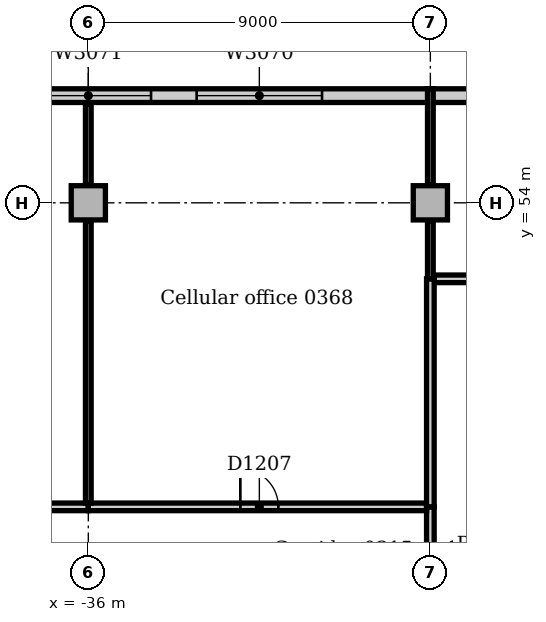
"""IFC4 building model, lengths in metres.
Left out: names, types, materials, properties, quantities, classifications, styles, units other than length and angle.
Written with IfcOpenShell. Run it as: python <this file> out.ifc"""

import sys

from ifc_helpers import new_model, si_unit, direction, frame, frame_2d, origin, origin_2d, place, context, subcontext, project, spatial, rectangle, extrude, element, fill, save


model = new_model("IFC4")
c1 = context("Model", 3, precision=1e-05, world=origin(), true_north=direction((0.0, 1.0)))
c2 = subcontext(c1, "Body", "Model", "MODEL_VIEW")
j1 = project(units=[si_unit("LENGTHUNIT", "METRE"), si_unit("PLANEANGLEUNIT", "RADIAN")], contexts=[c1])
p1 = place(None, origin())
s1 = spatial("IfcSite", under=j1, at=p1, CompositionType="ELEMENT")
p2 = place(p1, origin())
s2 = spatial("IfcBuilding", under=s1, at=p2, CompositionType="ELEMENT")
p3 = place(p2, frame((0.0, 0.0, 16.0)))
s3 = spatial("IfcBuildingStorey", under=s2, at=p3, CompositionType="ELEMENT", Elevation=16.0)
for number, where, z_axis, x_axis in (
    (1, (-36.0, 54.0, 0.0), (0.0, 0.0, 1.0), (1.0, 0.0, 0.0)),
    (2, (-27.0, 54.0, 0.0), (0.0, 0.0, 1.0), (1.0, 0.0, 0.0)),
):
    element("IfcColumn", number, at=place(p3, frame(where, z_axis=z_axis, x_axis=x_axis)), inside=s3, PredefinedType="COLUMN", context=c2, shape_type="SweptSolid", body=[
        extrude(rectangle(XDim=0.9, YDim=0.9, at=origin_2d()), origin(), (0.0, 0.0, 1.0), 4.7),
    ])
p4 = place(p3, frame((63.0, 56.82, 0.0), z_axis=(0.0, 0.0, 1.0), x_axis=(-1.0, 0.0, 0.0)))
e3 = element("IfcWall", 3, at=p4, inside=s3, PredefinedType="STANDARD", context=c2, shape_type="SweptSolid", body=[
    extrude(rectangle(XDim=144.0, YDim=0.36, at=frame_2d((72.0, 0.0))), origin(), (0.0, 0.0, 1.0), 4.7),
])
p5 = place(p4, frame((2.85, 0.0, 0.9)))
e4 = element("IfcOpeningElement", 4, at=p5, cuts=e3, PredefinedType="OPENING", context=c2, shape_type="SweptSolid", body=[
    extrude(rectangle(XDim=3.3, YDim=2.4, at=frame_2d((1.65, 1.2))), frame((0.0, 0.19, 0.0), z_axis=(0.0, -1.0, 0.0), x_axis=(1.0, 0.0, 0.0)), (0.0, 0.0, 1.0), 0.38),
])
p6 = place(p4, frame((7.35, 0.0, 0.9)))
e5 = element("IfcOpeningElement", 5, at=p6, cuts=e3, PredefinedType="OPENING", context=c2, shape_type="SweptSolid", body=[
    extrude(rectangle(XDim=3.3, YDim=2.4, at=frame_2d((1.65, 1.2))), frame((0.0, 0.19, 0.0), z_axis=(0.0, -1.0, 0.0), x_axis=(1.0, 0.0, 0.0)), (0.0, 0.0, 1.0), 0.38),
])
p7 = place(p4, frame((11.85, 0.0, 0.9)))
e6 = element("IfcOpeningElement", 6, at=p7, cuts=e3, PredefinedType="OPENING", context=c2, shape_type="SweptSolid", body=[
    extrude(rectangle(XDim=3.3, YDim=2.4, at=frame_2d((1.65, 1.2))), frame((0.0, 0.19, 0.0), z_axis=(0.0, -1.0, 0.0), x_axis=(1.0, 0.0, 0.0)), (0.0, 0.0, 1.0), 0.38),
])
p8 = place(p4, frame((16.35, 0.0, 0.9)))
e7 = element("IfcOpeningElement", 7, at=p8, cuts=e3, PredefinedType="OPENING", context=c2, shape_type="SweptSolid", body=[
    extrude(rectangle(XDim=3.3, YDim=2.4, at=frame_2d((1.65, 1.2))), frame((0.0, 0.19, 0.0), z_axis=(0.0, -1.0, 0.0), x_axis=(1.0, 0.0, 0.0)), (0.0, 0.0, 1.0), 0.38),
])
p9 = place(p4, frame((20.85, 0.0, 0.9)))
e8 = element("IfcOpeningElement", 8, at=p9, cuts=e3, PredefinedType="OPENING", context=c2, shape_type="SweptSolid", body=[
    extrude(rectangle(XDim=3.3, YDim=2.4, at=frame_2d((1.65, 1.2))), frame((0.0, 0.19, 0.0), z_axis=(0.0, -1.0, 0.0), x_axis=(1.0, 0.0, 0.0)), (0.0, 0.0, 1.0), 0.38),
])
p10 = place(p4, frame((25.35, 0.0, 0.9)))
e9 = element("IfcOpeningElement", 9, at=p10, cuts=e3, PredefinedType="OPENING", context=c2, shape_type="SweptSolid", body=[
    extrude(rectangle(XDim=3.3, YDim=2.4, at=frame_2d((1.65, 1.2))), frame((0.0, 0.19, 0.0), z_axis=(0.0, -1.0, 0.0), x_axis=(1.0, 0.0, 0.0)), (0.0, 0.0, 1.0), 0.38),
])
p11 = place(p4, frame((29.85, 0.0, 0.9)))
e10 = element("IfcOpeningElement", 10, at=p11, cuts=e3, PredefinedType="OPENING", context=c2, shape_type="SweptSolid", body=[
    extrude(rectangle(XDim=3.3, YDim=2.4, at=frame_2d((1.65, 1.2))), frame((0.0, 0.19, 0.0), z_axis=(0.0, -1.0, 0.0), x_axis=(1.0, 0.0, 0.0)), (0.0, 0.0, 1.0), 0.38),
])
p12 = place(p4, frame((34.35, 0.0, 0.9)))
e11 = element("IfcOpeningElement", 11, at=p12, cuts=e3, PredefinedType="OPENING", context=c2, shape_type="SweptSolid", body=[
    extrude(rectangle(XDim=3.3, YDim=2.4, at=frame_2d((1.65, 1.2))), frame((0.0, 0.19, 0.0), z_axis=(0.0, -1.0, 0.0), x_axis=(1.0, 0.0, 0.0)), (0.0, 0.0, 1.0), 0.38),
])
p13 = place(p4, frame((38.85, 0.0, 0.9)))
e12 = element("IfcOpeningElement", 12, at=p13, cuts=e3, PredefinedType="OPENING", context=c2, shape_type="SweptSolid", body=[
    extrude(rectangle(XDim=3.3, YDim=2.4, at=frame_2d((1.65, 1.2))), frame((0.0, 0.19, 0.0), z_axis=(0.0, -1.0, 0.0), x_axis=(1.0, 0.0, 0.0)), (0.0, 0.0, 1.0), 0.38),
])
p14 = place(p4, frame((43.35, 0.0, 0.9)))
e13 = element("IfcOpeningElement", 13, at=p14, cuts=e3, PredefinedType="OPENING", context=c2, shape_type="SweptSolid", body=[
    extrude(rectangle(XDim=3.3, YDim=2.4, at=frame_2d((1.65, 1.2))), frame((0.0, 0.19, 0.0), z_axis=(0.0, -1.0, 0.0), x_axis=(1.0, 0.0, 0.0)), (0.0, 0.0, 1.0), 0.38),
])
p15 = place(p4, frame((47.85, 0.0, 0.9)))
e14 = element("IfcOpeningElement", 14, at=p15, cuts=e3, PredefinedType="OPENING", context=c2, shape_type="SweptSolid", body=[
    extrude(rectangle(XDim=3.3, YDim=2.4, at=frame_2d((1.65, 1.2))), frame((0.0, 0.19, 0.0), z_axis=(0.0, -1.0, 0.0), x_axis=(1.0, 0.0, 0.0)), (0.0, 0.0, 1.0), 0.38),
])
p16 = place(p4, frame((52.35, 0.0, 0.9)))
e15 = element("IfcOpeningElement", 15, at=p16, cuts=e3, PredefinedType="OPENING", context=c2, shape_type="SweptSolid", body=[
    extrude(rectangle(XDim=3.3, YDim=2.4, at=frame_2d((1.65, 1.2))), frame((0.0, 0.19, 0.0), z_axis=(0.0, -1.0, 0.0), x_axis=(1.0, 0.0, 0.0)), (0.0, 0.0, 1.0), 0.38),
])
p17 = place(p4, frame((56.85, 0.0, 0.9)))
e16 = element("IfcOpeningElement", 16, at=p17, cuts=e3, PredefinedType="OPENING", context=c2, shape_type="SweptSolid", body=[
    extrude(rectangle(XDim=3.3, YDim=2.4, at=frame_2d((1.65, 1.2))), frame((0.0, 0.19, 0.0), z_axis=(0.0, -1.0, 0.0), x_axis=(1.0, 0.0, 0.0)), (0.0, 0.0, 1.0), 0.38),
])
p18 = place(p4, frame((92.85, 0.0, 0.9)))
e17 = element("IfcOpeningElement", 17, at=p18, cuts=e3, PredefinedType="OPENING", context=c2, shape_type="SweptSolid", body=[
    extrude(rectangle(XDim=3.3, YDim=2.4, at=frame_2d((1.65, 1.2))), frame((0.0, 0.19, 0.0), z_axis=(0.0, -1.0, 0.0), x_axis=(1.0, 0.0, 0.0)), (0.0, 0.0, 1.0), 0.38),
])
p19 = place(p4, frame((97.35, 0.0, 0.9)))
e18 = element("IfcOpeningElement", 18, at=p19, cuts=e3, PredefinedType="OPENING", context=c2, shape_type="SweptSolid", body=[
    extrude(rectangle(XDim=3.3, YDim=2.4, at=frame_2d((1.65, 1.2))), frame((0.0, 0.19, 0.0), z_axis=(0.0, -1.0, 0.0), x_axis=(1.0, 0.0, 0.0)), (0.0, 0.0, 1.0), 0.38),
])
p20 = place(p4, frame((101.85, 0.0, 0.9)))
e19 = element("IfcOpeningElement", 19, at=p20, cuts=e3, PredefinedType="OPENING", context=c2, shape_type="SweptSolid", body=[
    extrude(rectangle(XDim=3.3, YDim=2.4, at=frame_2d((1.65, 1.2))), frame((0.0, 0.19, 0.0), z_axis=(0.0, -1.0, 0.0), x_axis=(1.0, 0.0, 0.0)), (0.0, 0.0, 1.0), 0.38),
])
p21 = place(p4, frame((106.35, 0.0, 0.9)))
e20 = element("IfcOpeningElement", 20, at=p21, cuts=e3, PredefinedType="OPENING", context=c2, shape_type="SweptSolid", body=[
    extrude(rectangle(XDim=3.3, YDim=2.4, at=frame_2d((1.65, 1.2))), frame((0.0, 0.19, 0.0), z_axis=(0.0, -1.0, 0.0), x_axis=(1.0, 0.0, 0.0)), (0.0, 0.0, 1.0), 0.38),
])
p22 = place(p4, frame((110.85, 0.0, 0.9)))
e21 = element("IfcOpeningElement", 21, at=p22, cuts=e3, PredefinedType="OPENING", context=c2, shape_type="SweptSolid", body=[
    extrude(rectangle(XDim=3.3, YDim=2.4, at=frame_2d((1.65, 1.2))), frame((0.0, 0.19, 0.0), z_axis=(0.0, -1.0, 0.0), x_axis=(1.0, 0.0, 0.0)), (0.0, 0.0, 1.0), 0.38),
])
p23 = place(p4, frame((115.35, 0.0, 0.9)))
e22 = element("IfcOpeningElement", 22, at=p23, cuts=e3, PredefinedType="OPENING", context=c2, shape_type="SweptSolid", body=[
    extrude(rectangle(XDim=3.3, YDim=2.4, at=frame_2d((1.65, 1.2))), frame((0.0, 0.19, 0.0), z_axis=(0.0, -1.0, 0.0), x_axis=(1.0, 0.0, 0.0)), (0.0, 0.0, 1.0), 0.38),
])
p24 = place(p4, frame((119.85, 0.0, 0.9)))
e23 = element("IfcOpeningElement", 23, at=p24, cuts=e3, PredefinedType="OPENING", context=c2, shape_type="SweptSolid", body=[
    extrude(rectangle(XDim=3.3, YDim=2.4, at=frame_2d((1.65, 1.2))), frame((0.0, 0.19, 0.0), z_axis=(0.0, -1.0, 0.0), x_axis=(1.0, 0.0, 0.0)), (0.0, 0.0, 1.0), 0.38),
])
p25 = place(p4, frame((124.35, 0.0, 0.9)))
e24 = element("IfcOpeningElement", 24, at=p25, cuts=e3, PredefinedType="OPENING", context=c2, shape_type="SweptSolid", body=[
    extrude(rectangle(XDim=3.3, YDim=2.4, at=frame_2d((1.65, 1.2))), frame((0.0, 0.19, 0.0), z_axis=(0.0, -1.0, 0.0), x_axis=(1.0, 0.0, 0.0)), (0.0, 0.0, 1.0), 0.38),
])
p26 = place(p4, frame((128.85, 0.0, 0.9)))
e25 = element("IfcOpeningElement", 25, at=p26, cuts=e3, PredefinedType="OPENING", context=c2, shape_type="SweptSolid", body=[
    extrude(rectangle(XDim=3.3, YDim=2.4, at=frame_2d((1.65, 1.2))), frame((0.0, 0.19, 0.0), z_axis=(0.0, -1.0, 0.0), x_axis=(1.0, 0.0, 0.0)), (0.0, 0.0, 1.0), 0.38),
])
p27 = place(p4, frame((133.35, 0.0, 0.9)))
e26 = element("IfcOpeningElement", 26, at=p27, cuts=e3, PredefinedType="OPENING", context=c2, shape_type="SweptSolid", body=[
    extrude(rectangle(XDim=3.3, YDim=2.4, at=frame_2d((1.65, 1.2))), frame((0.0, 0.19, 0.0), z_axis=(0.0, -1.0, 0.0), x_axis=(1.0, 0.0, 0.0)), (0.0, 0.0, 1.0), 0.38),
])
p28 = place(p4, frame((137.85, 0.0, 0.9)))
e27 = element("IfcOpeningElement", 27, at=p28, cuts=e3, PredefinedType="OPENING", context=c2, shape_type="SweptSolid", body=[
    extrude(rectangle(XDim=3.3, YDim=2.4, at=frame_2d((1.65, 1.2))), frame((0.0, 0.19, 0.0), z_axis=(0.0, -1.0, 0.0), x_axis=(1.0, 0.0, 0.0)), (0.0, 0.0, 1.0), 0.38),
])
p29 = place(p3, frame((-27.0, 45.0, 0.0), z_axis=(0.0, 0.0, 1.0), x_axis=(0.0, 1.0, 0.0)))
e28 = element("IfcWall", 28, at=p29, inside=s3, PredefinedType="PARTITIONING", context=c2, shape_type="SweptSolid", body=[
    extrude(rectangle(XDim=1.0, YDim=0.2, at=frame_2d((0.5, 0.0))), origin(), (0.0, 0.0, 1.0), 4.7),
])
p30 = place(p3, frame((-42.0, 46.0, 0.0), z_axis=(0.0, 0.0, 1.0), x_axis=(1.0, 0.0, 0.0)))
e29 = element("IfcWall", 29, at=p30, inside=s3, PredefinedType="PARTITIONING", context=c2, shape_type="SweptSolid", body=[
    extrude(rectangle(XDim=6.0, YDim=0.2, at=frame_2d((3.0, 0.0))), origin(), (0.0, 0.0, 1.0), 4.7),
])
p31 = place(p30, frame((2.5, 0.0, 0.0)))
e30 = element("IfcOpeningElement", 30, at=p31, cuts=e29, PredefinedType="OPENING", context=c2, shape_type="SweptSolid", body=[
    extrude(rectangle(XDim=1.0, YDim=2.1, at=frame_2d((0.5, 1.05))), frame((0.0, 0.11, 0.0), z_axis=(0.0, -1.0, 0.0), x_axis=(1.0, 0.0, 0.0)), (0.0, 0.0, 1.0), 0.22),
])
p32 = place(p3, frame((-36.0, 46.0, 0.0), z_axis=(0.0, 0.0, 1.0), x_axis=(1.0, 0.0, 0.0)))
e31 = element("IfcWall", 31, at=p32, inside=s3, PredefinedType="PARTITIONING", context=c2, shape_type="SweptSolid", body=[
    extrude(rectangle(XDim=8.9, YDim=0.2, at=frame_2d((4.45, 0.0))), origin(), (0.0, 0.0, 1.0), 4.7),
])
p33 = place(p32, frame((4.0, 0.0, 0.0)))
e32 = element("IfcOpeningElement", 32, at=p33, cuts=e31, PredefinedType="OPENING", context=c2, shape_type="SweptSolid", body=[
    extrude(rectangle(XDim=1.0, YDim=2.1, at=frame_2d((0.5, 1.05))), frame((0.0, 0.11, 0.0), z_axis=(0.0, -1.0, 0.0), x_axis=(1.0, 0.0, 0.0)), (0.0, 0.0, 1.0), 0.22),
])
p34 = place(p3, frame((-26.9, 52.0, 0.0), z_axis=(0.0, 0.0, 1.0), x_axis=(1.0, 0.0, 0.0)))
e33 = element("IfcWall", 33, at=p34, inside=s3, PredefinedType="PARTITIONING", context=c2, shape_type="SweptSolid", body=[
    extrude(rectangle(XDim=8.9, YDim=0.2, at=frame_2d((4.45, 0.0))), origin(), (0.0, 0.0, 1.0), 4.7),
])
p35 = place(p34, frame((3.9, 0.0, 0.0)))
e34 = element("IfcOpeningElement", 34, at=p35, cuts=e33, PredefinedType="OPENING", context=c2, shape_type="SweptSolid", body=[
    extrude(rectangle(XDim=1.0, YDim=2.1, at=frame_2d((0.5, 1.05))), frame((0.0, 0.11, 0.0), z_axis=(0.0, -1.0, 0.0), x_axis=(1.0, 0.0, 0.0)), (0.0, 0.0, 1.0), 0.22),
])
p36 = place(p3, frame((-27.0, 46.0, 0.0), z_axis=(0.0, 0.0, 1.0), x_axis=(0.0, 1.0, 0.0)))
e35 = element("IfcWall", 35, at=p36, inside=s3, PredefinedType="PARTITIONING", context=c2, shape_type="SweptSolid", body=[
    extrude(rectangle(XDim=6.0, YDim=0.2, at=frame_2d((3.0, 0.0))), origin(), (0.0, 0.0, 1.0), 4.7),
])
p37 = place(p3, frame((-27.0, 52.0, 0.0), z_axis=(0.0, 0.0, 1.0), x_axis=(0.0, 1.0, 0.0)))
e36 = element("IfcWall", 36, at=p37, inside=s3, PredefinedType="PARTITIONING", context=c2, shape_type="SweptSolid", body=[
    extrude(rectangle(XDim=1.53, YDim=0.15, at=frame_2d((0.765, 0.0))), origin(), (0.0, 0.0, 1.0), 4.7),
])
p38 = place(p3, frame((-27.0, 54.47, 0.0), z_axis=(0.0, 0.0, 1.0), x_axis=(0.0, 1.0, 0.0)))
e37 = element("IfcWall", 37, at=p38, inside=s3, PredefinedType="PARTITIONING", context=c2, shape_type="SweptSolid", body=[
    extrude(rectangle(XDim=2.53, YDim=0.15, at=frame_2d((1.265, 0.0))), origin(), (0.0, 0.0, 1.0), 4.7),
])
p39 = place(p3, frame((-36.0, 46.1, 0.0), z_axis=(0.0, 0.0, 1.0), x_axis=(0.0, 1.0, 0.0)))
e38 = element("IfcWall", 38, at=p39, inside=s3, PredefinedType="PARTITIONING", context=c2, shape_type="SweptSolid", body=[
    extrude(rectangle(XDim=7.43, YDim=0.15, at=frame_2d((3.715, 0.0))), origin(), (0.0, 0.0, 1.0), 4.7),
])
p40 = place(p3, frame((-36.0, 54.47, 0.0), z_axis=(0.0, 0.0, 1.0), x_axis=(0.0, 1.0, 0.0)))
e39 = element("IfcWall", 39, at=p40, inside=s3, PredefinedType="PARTITIONING", context=c2, shape_type="SweptSolid", body=[
    extrude(rectangle(XDim=2.13, YDim=0.15, at=frame_2d((1.065, 0.0))), origin(), (0.0, 0.0, 1.0), 4.7),
])
p41 = place(p18, origin())
e40 = element("IfcWindow", 40, at=p41, inside=s3, PartitioningType="SINGLE_PANEL", PredefinedType="WINDOW", context=c2, shape_type="SweptSolid", body=[
    extrude(rectangle(XDim=3.3, YDim=2.4, at=frame_2d((1.65, 1.2))), frame((0.0, 0.13, 0.0), z_axis=(0.0, -1.0, 0.0), x_axis=(1.0, 0.0, 0.0)), (0.0, 0.0, 1.0), 0.06),
])
fill(e17, e40)
p42 = place(p19, origin())
e41 = element("IfcWindow", 41, at=p42, inside=s3, PartitioningType="SINGLE_PANEL", PredefinedType="WINDOW", context=c2, shape_type="SweptSolid", body=[
    extrude(rectangle(XDim=3.3, YDim=2.4, at=frame_2d((1.65, 1.2))), frame((0.0, 0.13, 0.0), z_axis=(0.0, -1.0, 0.0), x_axis=(1.0, 0.0, 0.0)), (0.0, 0.0, 1.0), 0.06),
])
fill(e18, e41)
p43 = place(p33, origin())
e42 = element("IfcDoor", 42, at=p43, inside=s3, OperationType="SINGLE_SWING_LEFT", PredefinedType="DOOR", context=c2, shape_type="SweptSolid", body=[
    extrude(rectangle(XDim=1.0, YDim=2.1, at=frame_2d((0.5, 1.05))), frame((0.0, 0.025, 0.0), z_axis=(0.0, -1.0, 0.0), x_axis=(1.0, 0.0, 0.0)), (0.0, 0.0, 1.0), 0.05),
])
fill(e32, e42)
save(model, sys.argv[1])
